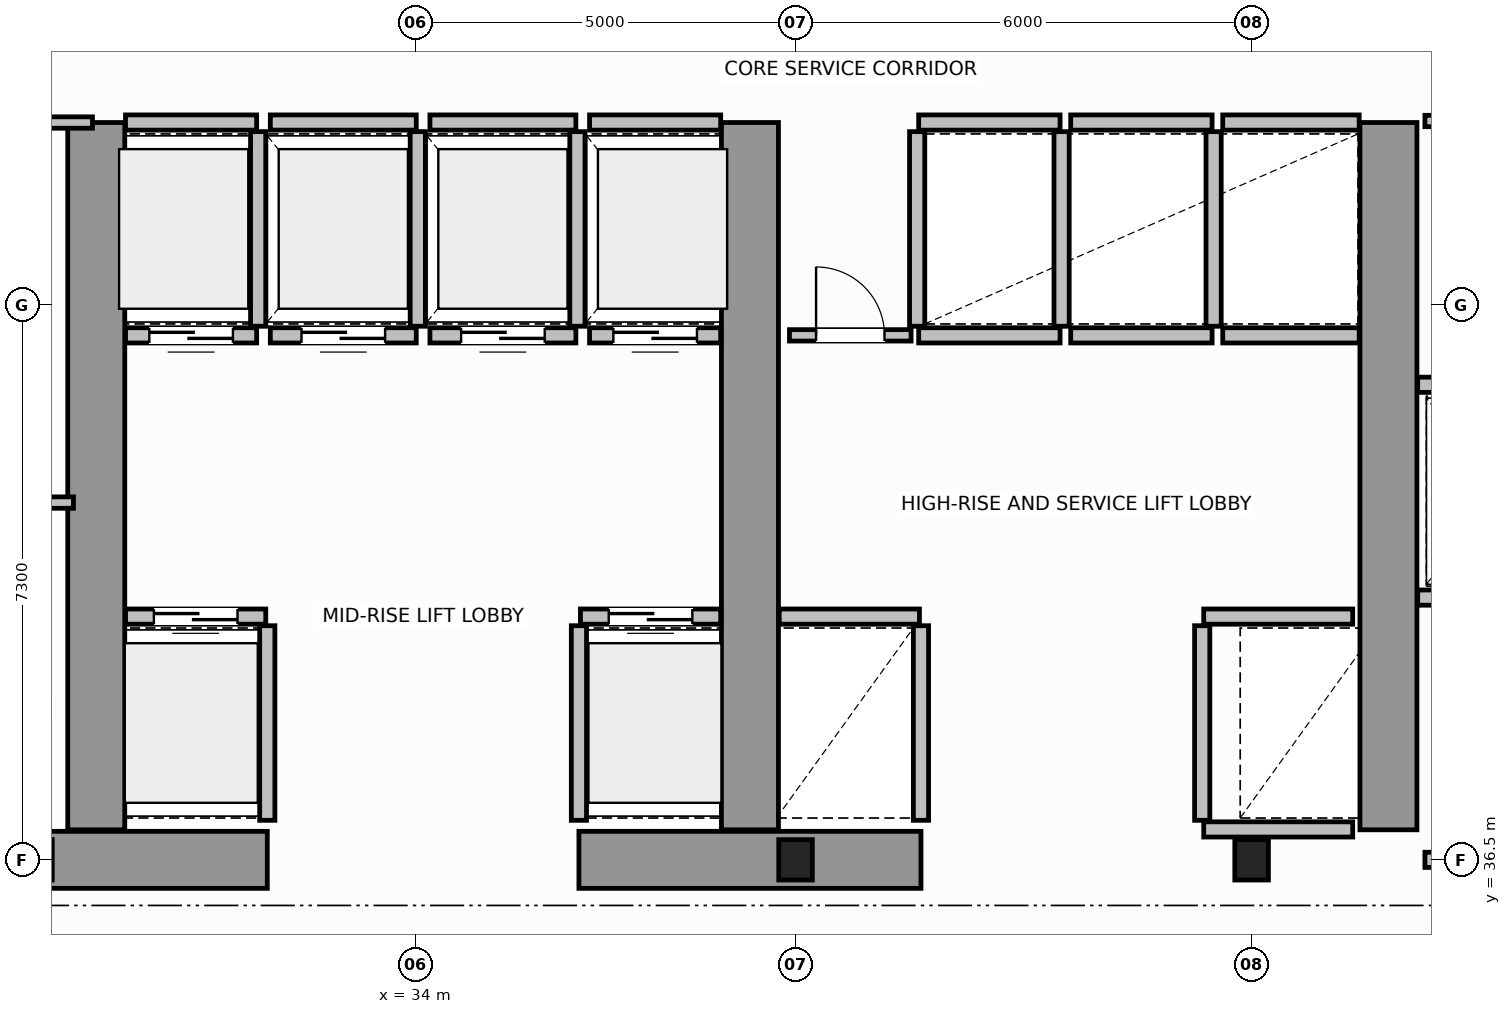
"""IFC4 building model, lengths in metres.
Left out: names, types, materials, properties, quantities, classifications, styles, units other than length and angle.
Written with IfcOpenShell. Run it as: python <this file> out.ifc"""

import sys

from ifc_helpers import new_model, si_unit, direction, frame, frame_2d, origin, origin_2d, place, context, subcontext, project, spatial, rectangle, i_section, extrude, source, transform, mapped, element, fill, save


model = new_model("IFC4")
c1 = context("Model", 3, precision=1e-05, world=origin(), true_north=direction((0.0, 1.0)))
c2 = subcontext(c1, "Body", "Model", "MODEL_VIEW")
j1 = project(units=[si_unit("LENGTHUNIT", "METRE"), si_unit("PLANEANGLEUNIT", "RADIAN")], contexts=[c1])
p1 = place(None, origin())
s1 = spatial("IfcSite", under=j1, at=p1, CompositionType="ELEMENT")
p2 = place(p1, origin())
s2 = spatial("IfcBuilding", under=s1, at=p2, CompositionType="ELEMENT")
p3 = place(p2, frame((0.0, 0.0, 130.0)))
s3 = spatial("IfcBuildingStorey", under=s2, at=p3, CompositionType="ELEMENT", Elevation=130.0)
m1 = source(origin(), c2, "Body", "SweptSolid", [
    extrude(i_section(OverallWidth=0.442, OverallDepth=0.531, WebThickness=0.065, FlangeThickness=0.076, FilletRadius=0.015, at=origin_2d()), origin(), (0.0, 0.0, 1.0), 3.8),
])
for number, where, z_axis, x_axis in (
    (1, (39.0, 36.5, 0.0), (0.0, 0.0, 1.0), (1.0, 0.0, 0.0)),
    (2, (45.0, 36.5, 0.0), (0.0, 0.0, 1.0), (1.0, 0.0, 0.0)),
):
    element("IfcColumn", number, at=place(p3, frame(where, z_axis=z_axis, x_axis=x_axis)), inside=s3, PredefinedType="COLUMN", context=c2, shape_type="MappedRepresentation", body=[
        mapped(m1, transform((0.0, 0.0, 0.0), scale=1.0)),
    ])
for number, where, z_axis, x_axis in (
    (3, (27.55, 36.5, 0.0), (0.0, 0.0, 1.0), (1.0, 0.0, 0.0)),
    (4, (36.15, 36.5, 0.0), (0.0, 0.0, 1.0), (1.0, 0.0, 0.0)),
):
    element("IfcWall", number, at=place(p3, frame(where, z_axis=z_axis, x_axis=x_axis)), inside=s3, PredefinedType="SHEAR", context=c2, shape_type="SweptSolid", body=[
        extrude(rectangle(XDim=4.5, YDim=0.75, at=frame_2d((2.25, 0.0))), origin(), (0.0, 0.0, 1.0), 3.8),
    ])
for number, where, z_axis, x_axis in (
    (5, (29.8, 36.895, 0.0), (0.0, 0.0, 1.0), (0.0, 1.0, 0.0)),
    (6, (38.4, 36.895, 0.0), (0.0, 0.0, 1.0), (0.0, 1.0, 0.0)),
    (7, (46.8, 36.895, 0.0), (0.0, 0.0, 1.0), (0.0, 1.0, 0.0)),
):
    element("IfcWall", number, at=place(p3, frame(where, z_axis=z_axis, x_axis=x_axis)), inside=s3, PredefinedType="SHEAR", context=c2, shape_type="SweptSolid", body=[
        extrude(rectangle(XDim=9.305, YDim=0.75, at=frame_2d((4.652, 0.0))), origin(), (0.0, 0.0, 1.0), 3.8),
    ])
p4 = place(p3, frame((47.28, 36.5, 0.0), z_axis=(0.0, 0.0, 1.0), x_axis=(1.0, 0.0, 0.0)))
e8 = element("IfcWall", 8, at=p4, inside=s3, PredefinedType="SOLIDWALL", context=c2, shape_type="SweptSolid", body=[
    extrude(rectangle(XDim=2.47, YDim=0.2, at=frame_2d((1.235, 0.0))), origin(), (0.0, 0.0, 1.0), 2.37),
])
p5 = place(p4, frame((0.65, 0.0, 0.0)))
e9 = element("IfcOpeningElement", 9, at=p5, cuts=e8, PredefinedType="OPENING", context=c2, shape_type="SweptSolid", body=[
    extrude(rectangle(XDim=1.1, YDim=2.15, at=frame_2d((0.55, 1.075))), frame((0.0, 0.11, 0.0), z_axis=(0.0, -1.0, 0.0), x_axis=(1.0, 0.0, 0.0)), (0.0, 0.0, 1.0), 0.22),
])
p6 = place(p3, frame((30.185, 39.7, 0.0), z_axis=(0.0, 0.0, 1.0), x_axis=(1.0, 0.0, 0.0)))
e10 = element("IfcWall", 10, at=p6, inside=s3, PredefinedType="SOLIDWALL", context=c2, shape_type="SweptSolid", body=[
    extrude(rectangle(XDim=1.845, YDim=0.2, at=frame_2d((0.922, 0.0))), origin(), (0.0, 0.0, 1.0), 3.58),
])
p7 = place(p6, frame((0.373, 0.0, 0.0)))
e11 = element("IfcOpeningElement", 11, at=p7, cuts=e10, PredefinedType="OPENING", context=c2, shape_type="SweptSolid", body=[
    extrude(rectangle(XDim=1.1, YDim=2.15, at=frame_2d((0.55, 1.075))), frame((0.0, 0.11, 0.0), z_axis=(0.0, -1.0, 0.0), x_axis=(1.0, 0.0, 0.0)), (0.0, 0.0, 1.0), 0.22),
])
p8 = place(p3, frame((32.05, 37.02, 0.0), z_axis=(0.0, 0.0, 1.0), x_axis=(0.0, 1.0, 0.0)))
e12 = element("IfcWall", 12, at=p8, inside=s3, PredefinedType="SOLIDWALL", context=c2, shape_type="SweptSolid", body=[
    extrude(rectangle(XDim=2.56, YDim=0.2, at=frame_2d((1.28, 0.0))), origin(), (0.0, 0.0, 1.0), 3.58),
])
p9 = place(p3, frame((36.17, 39.7, 0.0), z_axis=(0.0, 0.0, 1.0), x_axis=(1.0, 0.0, 0.0)))
e13 = element("IfcWall", 13, at=p9, inside=s3, PredefinedType="SOLIDWALL", context=c2, shape_type="SweptSolid", body=[
    extrude(rectangle(XDim=1.845, YDim=0.2, at=frame_2d((0.922, 0.0))), origin(), (0.0, 0.0, 1.0), 3.58),
])
p10 = place(p9, frame((0.372, 0.0, 0.0)))
e14 = element("IfcOpeningElement", 14, at=p10, cuts=e13, PredefinedType="OPENING", context=c2, shape_type="SweptSolid", body=[
    extrude(rectangle(XDim=1.1, YDim=2.15, at=frame_2d((0.55, 1.075))), frame((0.0, 0.11, 0.0), z_axis=(0.0, -1.0, 0.0), x_axis=(1.0, 0.0, 0.0)), (0.0, 0.0, 1.0), 0.22),
])
p11 = place(p3, frame((36.15, 37.02, 0.0), z_axis=(0.0, 0.0, 1.0), x_axis=(0.0, 1.0, 0.0)))
e15 = element("IfcWall", 15, at=p11, inside=s3, PredefinedType="SOLIDWALL", context=c2, shape_type="SweptSolid", body=[
    extrude(rectangle(XDim=2.56, YDim=0.2, at=frame_2d((1.28, 0.0))), origin(), (0.0, 0.0, 1.0), 3.58),
])
p12 = place(p3, frame((30.185, 43.4, 0.0), z_axis=(0.0, 0.0, 1.0), x_axis=(1.0, 0.0, 0.0)))
e16 = element("IfcWall", 16, at=p12, inside=s3, PredefinedType="SOLIDWALL", context=c2, shape_type="SweptSolid", body=[
    extrude(rectangle(XDim=1.725, YDim=0.2, at=frame_2d((0.862, 0.0))), origin(), (0.0, 0.0, 1.0), 3.58),
])
p13 = place(p12, frame((0.313, 0.0, 0.0)))
e17 = element("IfcOpeningElement", 17, at=p13, cuts=e16, PredefinedType="OPENING", context=c2, shape_type="SweptSolid", body=[
    extrude(rectangle(XDim=1.1, YDim=2.15, at=frame_2d((0.55, 1.075))), frame((0.0, 0.11, 0.0), z_axis=(0.0, -1.0, 0.0), x_axis=(1.0, 0.0, 0.0)), (0.0, 0.0, 1.0), 0.22),
])
p14 = place(p3, frame((30.185, 46.2, 0.0), z_axis=(0.0, 0.0, 1.0), x_axis=(1.0, 0.0, 0.0)))
e18 = element("IfcWall", 18, at=p14, inside=s3, PredefinedType="SOLIDWALL", context=c2, shape_type="SweptSolid", body=[
    extrude(rectangle(XDim=1.725, YDim=0.2, at=frame_2d((0.862, 0.0))), origin(), (0.0, 0.0, 1.0), 3.58),
])
p15 = place(p3, frame((31.93, 43.52, 0.0), z_axis=(0.0, 0.0, 1.0), x_axis=(0.0, 1.0, 0.0)))
e19 = element("IfcWall", 19, at=p15, inside=s3, PredefinedType="SOLIDWALL", context=c2, shape_type="SweptSolid", body=[
    extrude(rectangle(XDim=2.56, YDim=0.2, at=frame_2d((1.28, 0.0))), origin(), (0.0, 0.0, 1.0), 3.58),
])
p16 = place(p3, frame((32.09, 43.4, 0.0), z_axis=(0.0, 0.0, 1.0), x_axis=(1.0, 0.0, 0.0)))
e20 = element("IfcWall", 20, at=p16, inside=s3, PredefinedType="SOLIDWALL", context=c2, shape_type="SweptSolid", body=[
    extrude(rectangle(XDim=1.92, YDim=0.2, at=frame_2d((0.96, 0.0))), origin(), (0.0, 0.0, 1.0), 3.58),
])
p17 = place(p16, frame((0.41, 0.0, 0.0)))
e21 = element("IfcOpeningElement", 21, at=p17, cuts=e20, PredefinedType="OPENING", context=c2, shape_type="SweptSolid", body=[
    extrude(rectangle(XDim=1.1, YDim=2.15, at=frame_2d((0.55, 1.075))), frame((0.0, 0.11, 0.0), z_axis=(0.0, -1.0, 0.0), x_axis=(1.0, 0.0, 0.0)), (0.0, 0.0, 1.0), 0.22),
])
p18 = place(p3, frame((32.09, 46.2, 0.0), z_axis=(0.0, 0.0, 1.0), x_axis=(1.0, 0.0, 0.0)))
e22 = element("IfcWall", 22, at=p18, inside=s3, PredefinedType="SOLIDWALL", context=c2, shape_type="SweptSolid", body=[
    extrude(rectangle(XDim=1.92, YDim=0.2, at=frame_2d((0.96, 0.0))), origin(), (0.0, 0.0, 1.0), 3.58),
])
p19 = place(p3, frame((34.03, 43.52, 0.0), z_axis=(0.0, 0.0, 1.0), x_axis=(0.0, 1.0, 0.0)))
e23 = element("IfcWall", 23, at=p19, inside=s3, PredefinedType="SOLIDWALL", context=c2, shape_type="SweptSolid", body=[
    extrude(rectangle(XDim=2.56, YDim=0.2, at=frame_2d((1.28, 0.0))), origin(), (0.0, 0.0, 1.0), 3.58),
])
p20 = place(p3, frame((34.19, 43.4, 0.0), z_axis=(0.0, 0.0, 1.0), x_axis=(1.0, 0.0, 0.0)))
e24 = element("IfcWall", 24, at=p20, inside=s3, PredefinedType="SOLIDWALL", context=c2, shape_type="SweptSolid", body=[
    extrude(rectangle(XDim=1.92, YDim=0.2, at=frame_2d((0.96, 0.0))), origin(), (0.0, 0.0, 1.0), 3.58),
])
p21 = place(p20, frame((0.41, 0.0, 0.0)))
e25 = element("IfcOpeningElement", 25, at=p21, cuts=e24, PredefinedType="OPENING", context=c2, shape_type="SweptSolid", body=[
    extrude(rectangle(XDim=1.1, YDim=2.15, at=frame_2d((0.55, 1.075))), frame((0.0, 0.11, 0.0), z_axis=(0.0, -1.0, 0.0), x_axis=(1.0, 0.0, 0.0)), (0.0, 0.0, 1.0), 0.22),
])
p22 = place(p3, frame((34.19, 46.2, 0.0), z_axis=(0.0, 0.0, 1.0), x_axis=(1.0, 0.0, 0.0)))
e26 = element("IfcWall", 26, at=p22, inside=s3, PredefinedType="SOLIDWALL", context=c2, shape_type="SweptSolid", body=[
    extrude(rectangle(XDim=1.92, YDim=0.2, at=frame_2d((0.96, 0.0))), origin(), (0.0, 0.0, 1.0), 3.58),
])
p23 = place(p3, frame((36.13, 43.52, 0.0), z_axis=(0.0, 0.0, 1.0), x_axis=(0.0, 1.0, 0.0)))
e27 = element("IfcWall", 27, at=p23, inside=s3, PredefinedType="SOLIDWALL", context=c2, shape_type="SweptSolid", body=[
    extrude(rectangle(XDim=2.56, YDim=0.2, at=frame_2d((1.28, 0.0))), origin(), (0.0, 0.0, 1.0), 3.58),
])
p24 = place(p3, frame((36.29, 43.4, 0.0), z_axis=(0.0, 0.0, 1.0), x_axis=(1.0, 0.0, 0.0)))
e28 = element("IfcWall", 28, at=p24, inside=s3, PredefinedType="SOLIDWALL", context=c2, shape_type="SweptSolid", body=[
    extrude(rectangle(XDim=1.725, YDim=0.2, at=frame_2d((0.862, 0.0))), origin(), (0.0, 0.0, 1.0), 3.58),
])
p25 = place(p24, frame((0.313, 0.0, 0.0)))
e29 = element("IfcOpeningElement", 29, at=p25, cuts=e28, PredefinedType="OPENING", context=c2, shape_type="SweptSolid", body=[
    extrude(rectangle(XDim=1.1, YDim=2.15, at=frame_2d((0.55, 1.075))), frame((0.0, 0.11, 0.0), z_axis=(0.0, -1.0, 0.0), x_axis=(1.0, 0.0, 0.0)), (0.0, 0.0, 1.0), 0.22),
])
p26 = place(p3, frame((36.29, 46.2, 0.0), z_axis=(0.0, 0.0, 1.0), x_axis=(1.0, 0.0, 0.0)))
e30 = element("IfcWall", 30, at=p26, inside=s3, PredefinedType="SOLIDWALL", context=c2, shape_type="SweptSolid", body=[
    extrude(rectangle(XDim=1.725, YDim=0.2, at=frame_2d((0.862, 0.0))), origin(), (0.0, 0.0, 1.0), 3.58),
])
p27 = place(p3, frame((38.785, 39.7, 0.0), z_axis=(0.0, 0.0, 1.0), x_axis=(1.0, 0.0, 0.0)))
e31 = element("IfcWall", 31, at=p27, inside=s3, PredefinedType="SOLIDWALL", context=c2, shape_type="SweptSolid", body=[
    extrude(rectangle(XDim=1.845, YDim=0.2, at=frame_2d((0.922, 0.0))), origin(), (0.0, 0.0, 1.0), 3.58),
])
p28 = place(p3, frame((40.65, 37.02, 0.0), z_axis=(0.0, 0.0, 1.0), x_axis=(0.0, 1.0, 0.0)))
e32 = element("IfcWall", 32, at=p28, inside=s3, PredefinedType="SOLIDWALL", context=c2, shape_type="SweptSolid", body=[
    extrude(rectangle(XDim=2.56, YDim=0.2, at=frame_2d((1.28, 0.0))), origin(), (0.0, 0.0, 1.0), 3.58),
])
p29 = place(p3, frame((44.37, 39.7, 0.0), z_axis=(0.0, 0.0, 1.0), x_axis=(1.0, 0.0, 0.0)))
e33 = element("IfcWall", 33, at=p29, inside=s3, PredefinedType="SOLIDWALL", context=c2, shape_type="SweptSolid", body=[
    extrude(rectangle(XDim=1.96, YDim=0.2, at=frame_2d((0.98, 0.0))), origin(), (0.0, 0.0, 1.0), 3.58),
])
p30 = place(p3, frame((44.37, 36.9, 0.0), z_axis=(0.0, 0.0, 1.0), x_axis=(1.0, 0.0, 0.0)))
e34 = element("IfcWall", 34, at=p30, inside=s3, PredefinedType="SOLIDWALL", context=c2, shape_type="SweptSolid", body=[
    extrude(rectangle(XDim=1.96, YDim=0.2, at=frame_2d((0.98, 0.0))), origin(), (0.0, 0.0, 1.0), 2.37),
])
p31 = place(p3, frame((44.35, 37.02, 0.0), z_axis=(0.0, 0.0, 1.0), x_axis=(0.0, 1.0, 0.0)))
e35 = element("IfcWall", 35, at=p31, inside=s3, PredefinedType="SOLIDWALL", context=c2, shape_type="SweptSolid", body=[
    extrude(rectangle(XDim=2.56, YDim=0.2, at=frame_2d((1.28, 0.0))), origin(), (0.0, 0.0, 1.0), 3.58),
])
for number, where, z_axis, x_axis in (
    (36, (40.62, 43.4, 0.0), (0.0, 0.0, 1.0), (1.0, 0.0, 0.0)),
    (37, (40.62, 46.2, 0.0), (0.0, 0.0, 1.0), (1.0, 0.0, 0.0)),
):
    element("IfcWall", number, at=place(p3, frame(where, z_axis=z_axis, x_axis=x_axis)), inside=s3, PredefinedType="SOLIDWALL", context=c2, shape_type="SweptSolid", body=[
        extrude(rectangle(XDim=1.86, YDim=0.2, at=frame_2d((0.93, 0.0))), origin(), (0.0, 0.0, 1.0), 3.58),
    ])
for number, where, z_axis, x_axis in (
    (38, (40.6, 43.52, 0.0), (0.0, 0.0, 1.0), (0.0, 1.0, 0.0)),
    (39, (42.5, 43.52, 0.0), (0.0, 0.0, 1.0), (0.0, 1.0, 0.0)),
):
    element("IfcWall", number, at=place(p3, frame(where, z_axis=z_axis, x_axis=x_axis)), inside=s3, PredefinedType="SOLIDWALL", context=c2, shape_type="SweptSolid", body=[
        extrude(rectangle(XDim=2.56, YDim=0.2, at=frame_2d((1.28, 0.0))), origin(), (0.0, 0.0, 1.0), 3.58),
    ])
for number, where, z_axis, x_axis in (
    (40, (42.62, 43.4, 0.0), (0.0, 0.0, 1.0), (1.0, 0.0, 0.0)),
    (41, (42.62, 46.2, 0.0), (0.0, 0.0, 1.0), (1.0, 0.0, 0.0)),
):
    element("IfcWall", number, at=place(p3, frame(where, z_axis=z_axis, x_axis=x_axis)), inside=s3, PredefinedType="SOLIDWALL", context=c2, shape_type="SweptSolid", body=[
        extrude(rectangle(XDim=1.86, YDim=0.2, at=frame_2d((0.93, 0.0))), origin(), (0.0, 0.0, 1.0), 3.58),
    ])
p32 = place(p3, frame((44.5, 43.52, 0.0), z_axis=(0.0, 0.0, 1.0), x_axis=(0.0, 1.0, 0.0)))
e42 = element("IfcWall", 42, at=p32, inside=s3, PredefinedType="SOLIDWALL", context=c2, shape_type="SweptSolid", body=[
    extrude(rectangle(XDim=2.56, YDim=0.2, at=frame_2d((1.28, 0.0))), origin(), (0.0, 0.0, 1.0), 3.58),
])
for number, where, z_axis, x_axis in (
    (43, (44.62, 43.4, 0.0), (0.0, 0.0, 1.0), (1.0, 0.0, 0.0)),
    (44, (44.62, 46.2, 0.0), (0.0, 0.0, 1.0), (1.0, 0.0, 0.0)),
):
    element("IfcWall", number, at=place(p3, frame(where, z_axis=z_axis, x_axis=x_axis)), inside=s3, PredefinedType="SOLIDWALL", context=c2, shape_type="SweptSolid", body=[
        extrude(rectangle(XDim=1.795, YDim=0.2, at=frame_2d((0.897, 0.0))), origin(), (0.0, 0.0, 1.0), 3.58),
    ])
p33 = place(p3, frame((47.185, 39.95, 0.0), z_axis=(0.0, 0.0, 1.0), x_axis=(1.0, 0.0, 0.0)))
e45 = element("IfcWall", 45, at=p33, inside=s3, PredefinedType="SOLIDWALL", context=c2, shape_type="SweptSolid", body=[
    extrude(rectangle(XDim=2.145, YDim=0.2, at=frame_2d((1.073, 0.0))), origin(), (0.0, 0.0, 1.0), 3.58),
])
p34 = place(p33, frame((0.522, 0.0, 0.0)))
e46 = element("IfcOpeningElement", 46, at=p34, cuts=e45, PredefinedType="OPENING", context=c2, shape_type="SweptSolid", body=[
    extrude(rectangle(XDim=1.1, YDim=2.15, at=frame_2d((0.55, 1.075))), frame((0.0, 0.11, 0.0), z_axis=(0.0, -1.0, 0.0), x_axis=(1.0, 0.0, 0.0)), (0.0, 0.0, 1.0), 0.22),
])
p35 = place(p3, frame((47.185, 42.75, 0.0), z_axis=(0.0, 0.0, 1.0), x_axis=(1.0, 0.0, 0.0)))
e47 = element("IfcWall", 47, at=p35, inside=s3, PredefinedType="SOLIDWALL", context=c2, shape_type="SweptSolid", body=[
    extrude(rectangle(XDim=2.145, YDim=0.2, at=frame_2d((1.073, 0.0))), origin(), (0.0, 0.0, 1.0), 3.58),
])
p36 = place(p3, frame((21.25, 46.2, 0.0), z_axis=(0.0, 0.0, 1.0), x_axis=(1.0, 0.0, 0.0)))
e48 = element("IfcWall", 48, at=p36, inside=s3, PredefinedType="PARTITIONING", context=c2, shape_type="SweptSolid", body=[
    extrude(rectangle(XDim=8.5, YDim=0.15, at=frame_2d((4.25, 0.0))), origin(), (0.0, 0.0, 1.0), 3.58),
])
p37 = place(p3, frame((21.5, 41.2, 0.0), z_axis=(0.0, 0.0, 1.0), x_axis=(1.0, 0.0, 0.0)))
e49 = element("IfcWall", 49, at=p37, inside=s3, PredefinedType="PARTITIONING", context=c2, shape_type="SweptSolid", body=[
    extrude(rectangle(XDim=8.0, YDim=0.15, at=frame_2d((4.0, 0.0))), origin(), (0.0, 0.0, 1.0), 3.58),
])
p38 = place(p37, frame((3.4, 0.0, 0.0)))
e50 = element("IfcOpeningElement", 50, at=p38, cuts=e49, PredefinedType="OPENING", context=c2, shape_type="SweptSolid", body=[
    extrude(rectangle(XDim=0.9, YDim=2.1, at=frame_2d((0.45, 1.05))), frame((0.0, 0.085, 0.0), z_axis=(0.0, -1.0, 0.0), x_axis=(1.0, 0.0, 0.0)), (0.0, 0.0, 1.0), 0.17),
])
p39 = place(p3, frame((47.28, 46.22, 0.0), z_axis=(0.0, 0.0, 1.0), x_axis=(1.0, 0.0, 0.0)))
e51 = element("IfcWall", 51, at=p39, inside=s3, PredefinedType="PARTITIONING", context=c2, shape_type="SweptSolid", body=[
    extrude(rectangle(XDim=2.1, YDim=0.15, at=frame_2d((1.05, 0.0))), origin(), (0.0, 0.0, 1.0), 3.58),
])
p40 = place(p39, frame((0.55, 0.0, 0.0)))
e52 = element("IfcOpeningElement", 52, at=p40, cuts=e51, PredefinedType="OPENING", context=c2, shape_type="SweptSolid", body=[
    extrude(rectangle(XDim=0.9, YDim=2.1, at=frame_2d((0.45, 1.05))), frame((0.0, 0.085, 0.0), z_axis=(0.0, -1.0, 0.0), x_axis=(1.0, 0.0, 0.0)), (0.0, 0.0, 1.0), 0.17),
])
p41 = place(p3, frame((38.92, 43.4, 0.0), z_axis=(0.0, 0.0, 1.0), x_axis=(1.0, 0.0, 0.0)))
e53 = element("IfcWall", 53, at=p41, inside=s3, PredefinedType="PARTITIONING", context=c2, shape_type="SweptSolid", body=[
    extrude(rectangle(XDim=1.6, YDim=0.15, at=frame_2d((0.8, 0.0))), origin(), (0.0, 0.0, 1.0), 3.58),
])
p42 = place(p41, frame((0.35, 0.0, 0.0)))
e54 = element("IfcOpeningElement", 54, at=p42, cuts=e53, PredefinedType="OPENING", context=c2, shape_type="SweptSolid", body=[
    extrude(rectangle(XDim=0.9, YDim=2.1, at=frame_2d((0.45, 1.05))), frame((0.0, 0.085, 0.0), z_axis=(0.0, -1.0, 0.0), x_axis=(1.0, 0.0, 0.0)), (0.0, 0.0, 1.0), 0.17),
])
m2 = source(origin(), c2, "Body", "SweptSolid", [
    extrude(rectangle(XDim=1.1, YDim=2.15, at=frame_2d((0.55, 1.075))), frame((0.0, 0.025, 0.0), z_axis=(0.0, -1.0, 0.0), x_axis=(1.0, 0.0, 0.0)), (0.0, 0.0, 1.0), 0.05),
])
p43 = place(p7, origin())
e55 = element("IfcDoor", 55, at=p43, inside=s3, OperationType="DOUBLE_DOOR_SLIDING", PredefinedType="DOOR", context=c2, shape_type="MappedRepresentation", body=[
    mapped(m2, transform((0.0, 0.0, 0.0), scale=1.0)),
])
fill(e11, e55)
p44 = place(p10, origin())
e56 = element("IfcDoor", 56, at=p44, inside=s3, OperationType="DOUBLE_DOOR_SLIDING", PredefinedType="DOOR", context=c2, shape_type="MappedRepresentation", body=[
    mapped(m2, transform((0.0, 0.0, 0.0), scale=1.0)),
])
fill(e14, e56)
p45 = place(p13, origin())
e57 = element("IfcDoor", 57, at=p45, inside=s3, OperationType="DOUBLE_DOOR_SLIDING", PredefinedType="DOOR", context=c2, shape_type="MappedRepresentation", body=[
    mapped(m2, transform((0.0, 0.0, 0.0), scale=1.0)),
])
fill(e17, e57)
p46 = place(p17, origin())
e58 = element("IfcDoor", 58, at=p46, inside=s3, OperationType="DOUBLE_DOOR_SLIDING", PredefinedType="DOOR", context=c2, shape_type="MappedRepresentation", body=[
    mapped(m2, transform((0.0, 0.0, 0.0), scale=1.0)),
])
fill(e21, e58)
p47 = place(p21, origin())
e59 = element("IfcDoor", 59, at=p47, inside=s3, OperationType="DOUBLE_DOOR_SLIDING", PredefinedType="DOOR", context=c2, shape_type="MappedRepresentation", body=[
    mapped(m2, transform((0.0, 0.0, 0.0), scale=1.0)),
])
fill(e25, e59)
p48 = place(p25, origin())
e60 = element("IfcDoor", 60, at=p48, inside=s3, OperationType="DOUBLE_DOOR_SLIDING", PredefinedType="DOOR", context=c2, shape_type="MappedRepresentation", body=[
    mapped(m2, transform((0.0, 0.0, 0.0), scale=1.0)),
])
fill(e29, e60)
m3 = source(origin(), c2, "Body", "SweptSolid", [
    extrude(rectangle(XDim=0.9, YDim=2.1, at=frame_2d((0.45, 1.05))), frame((0.0, 0.025, 0.0), z_axis=(0.0, -1.0, 0.0), x_axis=(1.0, 0.0, 0.0)), (0.0, 0.0, 1.0), 0.05),
])
p49 = place(p42, origin())
e61 = element("IfcDoor", 61, at=p49, inside=s3, OperationType="SINGLE_SWING_LEFT", PredefinedType="DOOR", context=c2, shape_type="MappedRepresentation", body=[
    mapped(m3, transform((0.0, 0.0, 0.0), scale=1.0)),
])
fill(e54, e61)
save(model, sys.argv[1])
